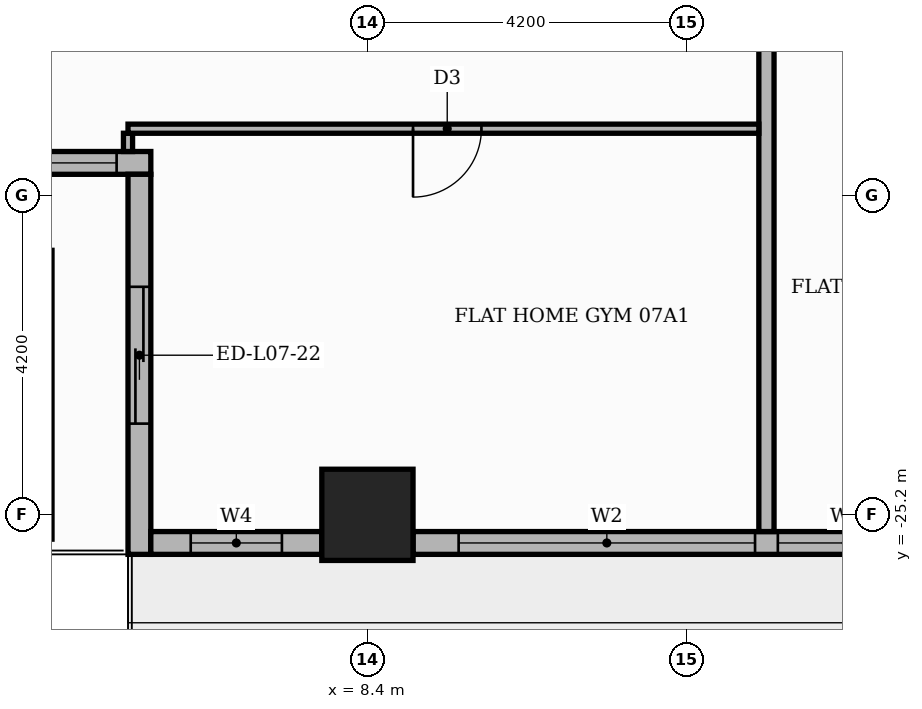
"""IFC4 building model, lengths in metres.
Left out: names, types, materials, properties, quantities, classifications, styles, units other than length and angle.
Written with IfcOpenShell. Run it as: python <this file> out.ifc"""

import sys

from ifc_helpers import new_model, si_unit, direction, frame, frame_2d, origin, origin_2d, place, context, subcontext, project, spatial, rectangle, extrude, element, fill, save


model = new_model("IFC4")
c1 = context("Model", 3, precision=1e-05, world=origin(), true_north=direction((0.0, 1.0)))
c2 = subcontext(c1, "Body", "Model", "MODEL_VIEW")
j1 = project(units=[si_unit("LENGTHUNIT", "METRE"), si_unit("PLANEANGLEUNIT", "RADIAN")], contexts=[c1])
p1 = place(None, origin())
s1 = spatial("IfcSite", under=j1, at=p1, CompositionType="ELEMENT")
p2 = place(p1, origin())
s2 = spatial("IfcBuilding", under=s1, at=p2, CompositionType="ELEMENT")
p3 = place(p2, frame((0.0, 0.0, 34.8)))
s3 = spatial("IfcBuildingStorey", under=s2, at=p3, CompositionType="ELEMENT", Elevation=34.8)
p4 = place(p3, frame((8.4, -25.2, 0.0), z_axis=(0.0, 0.0, 1.0), x_axis=(1.0, 0.0, 0.0)))
e1 = element("IfcColumn", 1, at=p4, inside=s3, PredefinedType="COLUMN", context=c2, shape_type="SweptSolid", body=[
    extrude(rectangle(XDim=1.2, YDim=1.2, at=origin_2d()), origin(), (0.0, 0.0, 1.0), 3.9),
])
p5 = place(p3, frame((-5.25, -20.57, 0.0), z_axis=(0.0, 0.0, 1.0), x_axis=(1.0, 0.0, 0.0)))
e2 = element("IfcWall", 2, at=p5, inside=s3, PredefinedType="STANDARD", context=c2, shape_type="SweptSolid", body=[
    extrude(rectangle(XDim=10.8, YDim=0.3, at=frame_2d((5.4, 0.0))), origin(), (0.0, 0.0, 1.0), 3.48),
])
p6 = place(p5, frame((0.15, 0.0, 0.9)))
e3 = element("IfcOpeningElement", 3, at=p6, cuts=e2, PredefinedType="OPENING", context=c2, shape_type="SweptSolid", body=[
    extrude(rectangle(XDim=6.0, YDim=2.1, at=frame_2d((3.0, 1.05))), frame((0.0, 0.16, 0.0), z_axis=(0.0, -1.0, 0.0), x_axis=(1.0, 0.0, 0.0)), (0.0, 0.0, 1.0), 0.32),
])
p7 = place(p5, frame((6.45, 0.0, 0.9)))
e4 = element("IfcOpeningElement", 4, at=p7, cuts=e2, PredefinedType="OPENING", context=c2, shape_type="SweptSolid", body=[
    extrude(rectangle(XDim=3.9, YDim=2.1, at=frame_2d((1.95, 1.05))), frame((0.0, 0.16, 0.0), z_axis=(0.0, -1.0, 0.0), x_axis=(1.0, 0.0, 0.0)), (0.0, 0.0, 1.0), 0.32),
])
p8 = place(p3, frame((5.4, -20.72, 0.0), z_axis=(0.0, 0.0, 1.0), x_axis=(0.0, -1.0, 0.0)))
e5 = element("IfcWall", 5, at=p8, inside=s3, PredefinedType="STANDARD", context=c2, shape_type="SweptSolid", body=[
    extrude(rectangle(XDim=5.0, YDim=0.3, at=frame_2d((2.5, 0.0))), origin(), (0.0, 0.0, 1.0), 3.48),
])
p9 = place(p8, frame((1.48, 0.0, 0.0)))
e6 = element("IfcOpeningElement", 6, at=p9, cuts=e5, PredefinedType="OPENING", context=c2, shape_type="SweptSolid", body=[
    extrude(rectangle(XDim=1.8, YDim=2.4, at=frame_2d((0.9, 1.2))), frame((0.0, 0.16, 0.0), z_axis=(0.0, -1.0, 0.0), x_axis=(1.0, 0.0, 0.0)), (0.0, 0.0, 1.0), 0.32),
])
p10 = place(p3, frame((5.55, -25.57, 0.0), z_axis=(0.0, 0.0, 1.0), x_axis=(1.0, 0.0, 0.0)))
e7 = element("IfcWall", 7, at=p10, inside=s3, PredefinedType="STANDARD", context=c2, shape_type="SweptSolid", body=[
    extrude(rectangle(XDim=2.25, YDim=0.3, at=frame_2d((1.125, 0.0))), origin(), (0.0, 0.0, 1.0), 3.48),
])
p11 = place(p10, frame((0.525, 0.0, 0.9)))
e8 = element("IfcOpeningElement", 8, at=p11, cuts=e7, PredefinedType="OPENING", context=c2, shape_type="SweptSolid", body=[
    extrude(rectangle(XDim=1.2, YDim=2.1, at=frame_2d((0.6, 1.05))), frame((0.0, 0.16, 0.0), z_axis=(0.0, -1.0, 0.0), x_axis=(1.0, 0.0, 0.0)), (0.0, 0.0, 1.0), 0.32),
])
p12 = place(p3, frame((9.0, -25.57, 0.0), z_axis=(0.0, 0.0, 1.0), x_axis=(1.0, 0.0, 0.0)))
e9 = element("IfcWall", 9, at=p12, inside=s3, PredefinedType="STANDARD", context=c2, shape_type="SweptSolid", body=[
    extrude(rectangle(XDim=7.2, YDim=0.3, at=frame_2d((3.6, 0.0))), origin(), (0.0, 0.0, 1.0), 3.48),
])
p13 = place(p12, frame((0.6, 0.0, 0.9)))
e10 = element("IfcOpeningElement", 10, at=p13, cuts=e9, PredefinedType="OPENING", context=c2, shape_type="SweptSolid", body=[
    extrude(rectangle(XDim=3.9, YDim=2.1, at=frame_2d((1.95, 1.05))), frame((0.0, 0.16, 0.0), z_axis=(0.0, -1.0, 0.0), x_axis=(1.0, 0.0, 0.0)), (0.0, 0.0, 1.0), 0.32),
])
p14 = place(p12, frame((4.8, 0.0, 0.9)))
e11 = element("IfcOpeningElement", 11, at=p14, cuts=e9, PredefinedType="OPENING", context=c2, shape_type="SweptSolid", body=[
    extrude(rectangle(XDim=1.8, YDim=2.1, at=frame_2d((0.9, 1.05))), frame((0.0, 0.16, 0.0), z_axis=(0.0, -1.0, 0.0), x_axis=(1.0, 0.0, 0.0)), (0.0, 0.0, 1.0), 0.32),
])
p15 = place(p3, frame((13.65, -25.42, 0.0), z_axis=(0.0, 0.0, 1.0), x_axis=(0.0, 1.0, 0.0)))
e12 = element("IfcWall", 12, at=p15, inside=s3, PredefinedType="PARTITIONING", context=c2, shape_type="SweptSolid", body=[
    extrude(rectangle(XDim=11.67, YDim=0.2, at=frame_2d((5.835, 0.0))), origin(), (0.0, 0.0, 1.0), 3.48),
])
p16 = place(p3, frame((5.25, -20.42, 0.0), z_axis=(0.0, 0.0, 1.0), x_axis=(0.0, 1.0, 0.0)))
e13 = element("IfcWall", 13, at=p16, inside=s3, PredefinedType="PARTITIONING", context=c2, shape_type="SweptSolid", body=[
    extrude(rectangle(XDim=0.24, YDim=0.12, at=frame_2d((0.12, 0.0))), origin(), (0.0, 0.0, 1.0), 3.48),
])
p17 = place(p3, frame((5.25, -20.12, 0.0), z_axis=(0.0, 0.0, 1.0), x_axis=(1.0, 0.0, 0.0)))
e14 = element("IfcWall", 14, at=p17, inside=s3, PredefinedType="PARTITIONING", context=c2, shape_type="SweptSolid", body=[
    extrude(rectangle(XDim=8.3, YDim=0.12, at=frame_2d((4.15, 0.0))), origin(), (0.0, 0.0, 1.0), 3.48),
])
p18 = place(p17, frame((3.75, 0.0, 0.0)))
e15 = element("IfcOpeningElement", 15, at=p18, cuts=e14, PredefinedType="OPENING", context=c2, shape_type="SweptSolid", body=[
    extrude(rectangle(XDim=0.9, YDim=2.1, at=frame_2d((0.45, 1.05))), frame((0.0, 0.07, 0.0), z_axis=(0.0, -1.0, 0.0), x_axis=(1.0, 0.0, 0.0)), (0.0, 0.0, 1.0), 0.14),
])
p19 = place(p7, origin())
e16 = element("IfcWindow", 16, at=p19, inside=s3, PartitioningType="SINGLE_PANEL", PredefinedType="WINDOW", context=c2, shape_type="SweptSolid", body=[
    extrude(rectangle(XDim=3.9, YDim=2.1, at=frame_2d((1.95, 1.05))), frame((0.0, 0.03, 0.0), z_axis=(0.0, -1.0, 0.0), x_axis=(1.0, 0.0, 0.0)), (0.0, 0.0, 1.0), 0.06),
])
fill(e4, e16)
p20 = place(p9, origin())
e17 = element("IfcDoor", 17, at=p20, inside=s3, OperationType="SLIDING_TO_RIGHT", PredefinedType="DOOR", context=c2, shape_type="SweptSolid", body=[
    extrude(rectangle(XDim=1.8, YDim=2.4, at=frame_2d((0.9, 1.2))), frame((0.0, 0.025, 0.0), z_axis=(0.0, -1.0, 0.0), x_axis=(1.0, 0.0, 0.0)), (0.0, 0.0, 1.0), 0.05),
])
fill(e6, e17)
p21 = place(p11, origin())
e18 = element("IfcWindow", 18, at=p21, inside=s3, PartitioningType="SINGLE_PANEL", PredefinedType="WINDOW", context=c2, shape_type="SweptSolid", body=[
    extrude(rectangle(XDim=1.2, YDim=2.1, at=frame_2d((0.6, 1.05))), frame((0.0, 0.03, 0.0), z_axis=(0.0, -1.0, 0.0), x_axis=(1.0, 0.0, 0.0)), (0.0, 0.0, 1.0), 0.06),
])
fill(e8, e18)
p22 = place(p13, origin())
e19 = element("IfcWindow", 19, at=p22, inside=s3, PartitioningType="SINGLE_PANEL", PredefinedType="WINDOW", context=c2, shape_type="SweptSolid", body=[
    extrude(rectangle(XDim=3.9, YDim=2.1, at=frame_2d((1.95, 1.05))), frame((0.0, 0.03, 0.0), z_axis=(0.0, -1.0, 0.0), x_axis=(1.0, 0.0, 0.0)), (0.0, 0.0, 1.0), 0.06),
])
fill(e10, e19)
p23 = place(p14, origin())
e20 = element("IfcWindow", 20, at=p23, inside=s3, PartitioningType="SINGLE_PANEL", PredefinedType="WINDOW", context=c2, shape_type="SweptSolid", body=[
    extrude(rectangle(XDim=1.8, YDim=2.1, at=frame_2d((0.9, 1.05))), frame((0.0, 0.03, 0.0), z_axis=(0.0, -1.0, 0.0), x_axis=(1.0, 0.0, 0.0)), (0.0, 0.0, 1.0), 0.06),
])
fill(e11, e20)
p24 = place(p18, frame((0.9, 0.0, 0.0), z_axis=(0.0, 0.0, 1.0), x_axis=(-1.0, 0.0, 0.0)))
e21 = element("IfcDoor", 21, at=p24, inside=s3, OperationType="SINGLE_SWING_LEFT", PredefinedType="DOOR", context=c2, shape_type="SweptSolid", body=[
    extrude(rectangle(XDim=0.9, YDim=2.1, at=frame_2d((0.45, 1.05))), frame((0.0, 0.025, 0.0), z_axis=(0.0, -1.0, 0.0), x_axis=(1.0, 0.0, 0.0)), (0.0, 0.0, 1.0), 0.05),
])
fill(e15, e21)
save(model, sys.argv[1])
